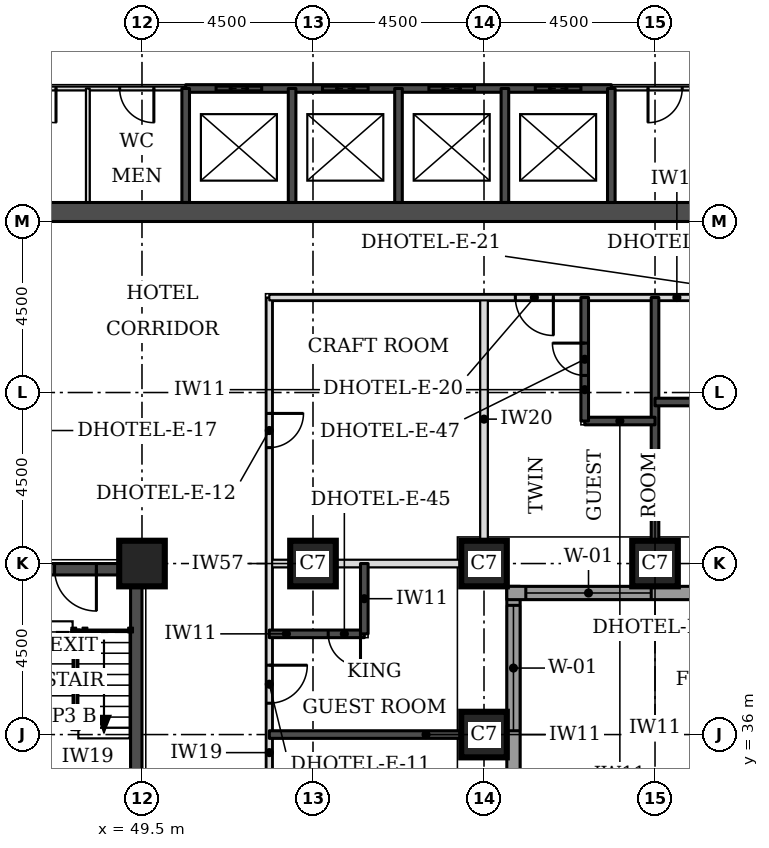
"""IFC4 building model, lengths in metres.
Left out: names, types, materials, properties, quantities, classifications, styles, units other than length and angle.
Written with IfcOpenShell. Run it as: python <this file> out.ifc"""

import sys

from ifc_helpers import new_model, si_unit, direction, frame, frame_2d, origin, origin_2d, place, context, subcontext, project, spatial, rectangle, extrude, element, fill, save


model = new_model("IFC4")
c1 = context("Model", 3, precision=1e-05, world=origin(), true_north=direction((0.0, 1.0)))
c2 = subcontext(c1, "Body", "Model", "MODEL_VIEW")
j1 = project(units=[si_unit("LENGTHUNIT", "METRE"), si_unit("PLANEANGLEUNIT", "RADIAN")], contexts=[c1])
p1 = place(None, origin())
s1 = spatial("IfcSite", under=j1, at=p1, CompositionType="ELEMENT")
p2 = place(p1, origin())
s2 = spatial("IfcBuilding", under=s1, at=p2, CompositionType="ELEMENT")
p3 = place(p2, frame((0.0, 0.0, 62.7)))
s3 = spatial("IfcBuildingStorey", under=s2, at=p3, CompositionType="ELEMENT", Elevation=62.7)
for number, where, z_axis, x_axis in (
    (1, (58.5, 36.0, 0.0), (0.0, 0.0, 1.0), (1.0, 0.0, 0.0)),
    (2, (49.5, 40.5, 0.0), (0.0, 0.0, 1.0), (1.0, 0.0, 0.0)),
    (3, (54.0, 40.5, 0.0), (0.0, 0.0, 1.0), (1.0, 0.0, 0.0)),
    (4, (58.5, 40.5, 0.0), (0.0, 0.0, 1.0), (1.0, 0.0, 0.0)),
    (5, (63.0, 40.5, 0.0), (0.0, 0.0, 1.0), (1.0, 0.0, 0.0)),
):
    element("IfcColumn", number, at=place(p3, frame(where, z_axis=z_axis, x_axis=x_axis)), inside=s3, PredefinedType="COLUMN", context=c2, shape_type="SweptSolid", body=[
        extrude(rectangle(XDim=1.2, YDim=1.2, at=origin_2d()), origin(), (0.0, 0.0, 1.0), 3.3),
    ])
p4 = place(p3, frame((45.5, 49.75, 0.0), z_axis=(0.0, 0.0, 1.0), x_axis=(1.0, 0.0, 0.0)))
e6 = element("IfcWall", 6, at=p4, inside=s3, PredefinedType="SHEAR", context=c2, shape_type="SweptSolid", body=[
    extrude(rectangle(XDim=21.5, YDim=0.5, at=frame_2d((10.75, 0.0))), origin(), (0.0, 0.0, 1.0), 3.3),
])
p5 = place(p3, frame((40.8, 40.35, 0.0), z_axis=(0.0, 0.0, 1.0), x_axis=(1.0, 0.0, 0.0)))
e7 = element("IfcWall", 7, at=p5, inside=s3, PredefinedType="SHEAR", context=c2, shape_type="SweptSolid", body=[
    extrude(rectangle(XDim=8.4, YDim=0.3, at=frame_2d((4.2, 0.0))), origin(), (0.0, 0.0, 1.0), 3.3),
])
p6 = place(p5, frame((6.4, 0.0, 0.0)))
e8 = element("IfcOpeningElement", 8, at=p6, cuts=e7, PredefinedType="OPENING", context=c2, shape_type="SweptSolid", body=[
    extrude(rectangle(XDim=1.1, YDim=2.1, at=frame_2d((0.55, 1.05))), frame((0.0, 0.16, 0.0), z_axis=(0.0, -1.0, 0.0), x_axis=(1.0, 0.0, 0.0)), (0.0, 0.0, 1.0), 0.32),
])
p7 = place(p3, frame((49.35, 31.5, 0.0), z_axis=(0.0, 0.0, 1.0), x_axis=(0.0, 1.0, 0.0)))
e9 = element("IfcWall", 9, at=p7, inside=s3, PredefinedType="SHEAR", context=c2, shape_type="SweptSolid", body=[
    extrude(rectangle(XDim=9.0, YDim=0.3, at=frame_2d((4.5, 0.0))), origin(), (0.0, 0.0, 1.0), 3.3),
])
p8 = place(p3, frame((59.275, 22.106, 0.0), z_axis=(0.0, 0.0, 1.0), x_axis=(0.0, 1.0, 0.0)))
e10 = element("IfcWall", 10, at=p8, inside=s3, PredefinedType="STANDARD", context=c2, shape_type="SweptSolid", body=[
    extrude(rectangle(XDim=17.793, YDim=0.35, at=frame_2d((8.897, 0.0))), origin(), (0.0, 0.0, 1.0), 3.055),
])
p9 = place(p8, frame((5.493, 0.0, 0.8)))
e11 = element("IfcOpeningElement", 11, at=p9, cuts=e10, PredefinedType="OPENING", context=c2, shape_type="SweptSolid", body=[
    extrude(rectangle(XDim=3.3, YDim=1.5, at=frame_2d((1.65, 0.75))), frame((0.0, 0.185, 0.0), z_axis=(0.0, -1.0, 0.0), x_axis=(1.0, 0.0, 0.0)), (0.0, 0.0, 1.0), 0.37),
])
p10 = place(p8, frame((13.993, 0.0, 0.8)))
e12 = element("IfcOpeningElement", 12, at=p10, cuts=e10, PredefinedType="OPENING", context=c2, shape_type="SweptSolid", body=[
    extrude(rectangle(XDim=3.3, YDim=1.5, at=frame_2d((1.65, 0.75))), frame((0.0, 0.185, 0.0), z_axis=(0.0, -1.0, 0.0), x_axis=(1.0, 0.0, 0.0)), (0.0, 0.0, 1.0), 0.37),
])
p11 = place(p3, frame((59.1, 39.725, 0.0), z_axis=(0.0, 0.0, 1.0), x_axis=(1.0, 0.0, 0.0)))
e13 = element("IfcWall", 13, at=p11, inside=s3, PredefinedType="STANDARD", context=c2, shape_type="SweptSolid", body=[
    extrude(rectangle(XDim=13.293, YDim=0.35, at=frame_2d((6.647, 0.0))), origin(), (0.0, 0.0, 1.0), 3.055),
])
p12 = place(p11, frame((0.5, 0.0, 0.8)))
e14 = element("IfcOpeningElement", 14, at=p12, cuts=e13, PredefinedType="OPENING", context=c2, shape_type="SweptSolid", body=[
    extrude(rectangle(XDim=3.3, YDim=1.5, at=frame_2d((1.65, 0.75))), frame((0.0, 0.185, 0.0), z_axis=(0.0, -1.0, 0.0), x_axis=(1.0, 0.0, 0.0)), (0.0, 0.0, 1.0), 0.37),
])
p13 = place(p3, frame((52.85, 40.5, 0.0), z_axis=(0.0, 0.0, 1.0), x_axis=(1.0, 0.0, 0.0)))
e15 = element("IfcWall", 15, at=p13, inside=s3, PredefinedType="PARTITIONING", context=c2, shape_type="SweptSolid", body=[
    extrude(rectangle(XDim=5.05, YDim=0.2, at=frame_2d((2.525, 0.0))), origin(), (0.0, 0.0, 1.0), 2.33),
])
p14 = place(p3, frame((58.5, 41.1, 0.0), z_axis=(0.0, 0.0, 1.0), x_axis=(0.0, 1.0, 0.0)))
e16 = element("IfcWall", 16, at=p14, inside=s3, PredefinedType="PARTITIONING", context=c2, shape_type="SweptSolid", body=[
    extrude(rectangle(XDim=6.4, YDim=0.2, at=frame_2d((3.2, 0.0))), origin(), (0.0, 0.0, 1.0), 3.08),
])
p15 = place(p3, frame((52.85, 25.15, 0.0), z_axis=(0.0, 0.0, 1.0), x_axis=(0.0, 1.0, 0.0)))
e17 = element("IfcWall", 17, at=p15, inside=s3, PredefinedType="PARTITIONING", context=c2, shape_type="SweptSolid", body=[
    extrude(rectangle(XDim=22.35, YDim=0.15, at=frame_2d((11.175, 0.0))), origin(), (0.0, 0.0, 1.0), 3.08),
])
p16 = place(p15, frame((0.347, 0.0, 0.0)))
e18 = element("IfcOpeningElement", 18, at=p16, cuts=e17, PredefinedType="OPENING", context=c2, shape_type="SweptSolid", body=[
    extrude(rectangle(XDim=1.0, YDim=2.1, at=frame_2d((0.5, 1.05))), frame((0.0, 0.085, 0.0), z_axis=(0.0, -1.0, 0.0), x_axis=(1.0, 0.0, 0.0)), (0.0, 0.0, 1.0), 0.17),
])
p17 = place(p15, frame((7.325, 0.0, 0.0)))
e19 = element("IfcOpeningElement", 19, at=p17, cuts=e17, PredefinedType="OPENING", context=c2, shape_type="SweptSolid", body=[
    extrude(rectangle(XDim=1.0, YDim=2.1, at=frame_2d((0.5, 1.05))), frame((0.0, 0.085, 0.0), z_axis=(0.0, -1.0, 0.0), x_axis=(1.0, 0.0, 0.0)), (0.0, 0.0, 1.0), 0.17),
])
p18 = place(p15, frame((11.675, 0.0, 0.0)))
e20 = element("IfcOpeningElement", 20, at=p18, cuts=e17, PredefinedType="OPENING", context=c2, shape_type="SweptSolid", body=[
    extrude(rectangle(XDim=1.0, YDim=2.1, at=frame_2d((0.5, 1.05))), frame((0.0, 0.085, 0.0), z_axis=(0.0, -1.0, 0.0), x_axis=(1.0, 0.0, 0.0)), (0.0, 0.0, 1.0), 0.17),
])
p19 = place(p15, frame((18.4, 0.0, 0.0)))
e21 = element("IfcOpeningElement", 21, at=p19, cuts=e17, PredefinedType="OPENING", context=c2, shape_type="SweptSolid", body=[
    extrude(rectangle(XDim=0.9, YDim=2.1, at=frame_2d((0.45, 1.05))), frame((0.0, 0.085, 0.0), z_axis=(0.0, -1.0, 0.0), x_axis=(1.0, 0.0, 0.0)), (0.0, 0.0, 1.0), 0.17),
])
p20 = place(p3, frame((52.85, 47.5, 0.0), z_axis=(0.0, 0.0, 1.0), x_axis=(1.0, 0.0, 0.0)))
e22 = element("IfcWall", 22, at=p20, inside=s3, PredefinedType="PARTITIONING", context=c2, shape_type="SweptSolid", body=[
    extrude(rectangle(XDim=16.65, YDim=0.15, at=frame_2d((8.325, 0.0))), origin(), (0.0, 0.0, 1.0), 3.08),
])
p21 = place(p20, frame((13.075, 0.0, 0.0)))
e23 = element("IfcOpeningElement", 23, at=p21, cuts=e22, PredefinedType="OPENING", context=c2, shape_type="SweptSolid", body=[
    extrude(rectangle(XDim=1.0, YDim=2.1, at=frame_2d((0.5, 1.05))), frame((0.0, 0.085, 0.0), z_axis=(0.0, -1.0, 0.0), x_axis=(1.0, 0.0, 0.0)), (0.0, 0.0, 1.0), 0.17),
])
p22 = place(p20, frame((6.475, 0.0, 0.0)))
e24 = element("IfcOpeningElement", 24, at=p22, cuts=e22, PredefinedType="OPENING", context=c2, shape_type="SweptSolid", body=[
    extrude(rectangle(XDim=1.0, YDim=2.1, at=frame_2d((0.5, 1.05))), frame((0.0, 0.085, 0.0), z_axis=(0.0, -1.0, 0.0), x_axis=(1.0, 0.0, 0.0)), (0.0, 0.0, 1.0), 0.17),
])
p23 = place(p20, frame((15.15, 0.0, 0.0)))
e25 = element("IfcOpeningElement", 25, at=p23, cuts=e22, PredefinedType="OPENING", context=c2, shape_type="SweptSolid", body=[
    extrude(rectangle(XDim=1.0, YDim=2.1, at=frame_2d((0.5, 1.05))), frame((0.0, 0.085, 0.0), z_axis=(0.0, -1.0, 0.0), x_axis=(1.0, 0.0, 0.0)), (0.0, 0.0, 1.0), 0.17),
])
p24 = place(p3, frame((52.85, 36.0, 0.0), z_axis=(0.0, 0.0, 1.0), x_axis=(1.0, 0.0, 0.0)))
e26 = element("IfcWall", 26, at=p24, inside=s3, PredefinedType="SOLIDWALL", context=c2, shape_type="SweptSolid", body=[
    extrude(rectangle(XDim=5.05, YDim=0.2, at=frame_2d((2.525, 0.0))), origin(), (0.0, 0.0, 1.0), 3.08),
])
p25 = place(p3, frame((52.85, 38.65, 0.0), z_axis=(0.0, 0.0, 1.0), x_axis=(1.0, 0.0, 0.0)))
e27 = element("IfcWall", 27, at=p25, inside=s3, PredefinedType="SOLIDWALL", context=c2, shape_type="SweptSolid", body=[
    extrude(rectangle(XDim=2.5, YDim=0.2, at=frame_2d((1.25, 0.0))), origin(), (0.0, 0.0, 1.0), 3.08),
])
p26 = place(p25, frame((1.55, 0.0, 0.0)))
e28 = element("IfcOpeningElement", 28, at=p26, cuts=e27, PredefinedType="OPENING", context=c2, shape_type="SweptSolid", body=[
    extrude(rectangle(XDim=0.85, YDim=2.1, at=frame_2d((0.425, 1.05))), frame((0.0, 0.11, 0.0), z_axis=(0.0, -1.0, 0.0), x_axis=(1.0, 0.0, 0.0)), (0.0, 0.0, 1.0), 0.22),
])
p27 = place(p3, frame((55.35, 38.65, 0.0), z_axis=(0.0, 0.0, 1.0), x_axis=(0.0, 1.0, 0.0)))
e29 = element("IfcWall", 29, at=p27, inside=s3, PredefinedType="SOLIDWALL", context=c2, shape_type="SweptSolid", body=[
    extrude(rectangle(XDim=1.85, YDim=0.2, at=frame_2d((0.925, 0.0))), origin(), (0.0, 0.0, 1.0), 3.08),
])
p28 = place(p3, frame((63.0, 41.1, 0.0), z_axis=(0.0, 0.0, 1.0), x_axis=(0.0, 1.0, 0.0)))
e30 = element("IfcWall", 30, at=p28, inside=s3, PredefinedType="SOLIDWALL", context=c2, shape_type="SweptSolid", body=[
    extrude(rectangle(XDim=6.4, YDim=0.2, at=frame_2d((3.2, 0.0))), origin(), (0.0, 0.0, 1.0), 3.08),
])
p29 = place(p3, frame((61.15, 44.25, 0.0), z_axis=(0.0, 0.0, 1.0), x_axis=(1.0, 0.0, 0.0)))
e31 = element("IfcWall", 31, at=p29, inside=s3, PredefinedType="SOLIDWALL", context=c2, shape_type="SweptSolid", body=[
    extrude(rectangle(XDim=1.85, YDim=0.2, at=frame_2d((0.925, 0.0))), origin(), (0.0, 0.0, 1.0), 3.08),
])
p30 = place(p3, frame((61.15, 44.25, 0.0), z_axis=(0.0, 0.0, 1.0), x_axis=(0.0, 1.0, 0.0)))
e32 = element("IfcWall", 32, at=p30, inside=s3, PredefinedType="SOLIDWALL", context=c2, shape_type="SweptSolid", body=[
    extrude(rectangle(XDim=3.25, YDim=0.2, at=frame_2d((1.625, 0.0))), origin(), (0.0, 0.0, 1.0), 3.08),
])
p31 = place(p30, frame((1.2, 0.0, 0.0)))
e33 = element("IfcOpeningElement", 33, at=p31, cuts=e32, PredefinedType="OPENING", context=c2, shape_type="SweptSolid", body=[
    extrude(rectangle(XDim=0.85, YDim=2.1, at=frame_2d((0.425, 1.05))), frame((0.0, 0.11, 0.0), z_axis=(0.0, -1.0, 0.0), x_axis=(1.0, 0.0, 0.0)), (0.0, 0.0, 1.0), 0.22),
])
p32 = place(p3, frame((63.0, 44.75, 0.0), z_axis=(0.0, 0.0, 1.0), x_axis=(1.0, 0.0, 0.0)))
e34 = element("IfcWall", 34, at=p32, inside=s3, PredefinedType="SOLIDWALL", context=c2, shape_type="SweptSolid", body=[
    extrude(rectangle(XDim=2.35, YDim=0.2, at=frame_2d((1.175, 0.0))), origin(), (0.0, 0.0, 1.0), 3.08),
])
p33 = place(p3, frame((45.5, 53.0, 0.0), z_axis=(0.0, 0.0, 1.0), x_axis=(1.0, 0.0, 0.0)))
e35 = element("IfcWall", 35, at=p33, inside=s3, PredefinedType="PARTITIONING", context=c2, shape_type="SweptSolid", body=[
    extrude(rectangle(XDim=5.15, YDim=0.1, at=frame_2d((2.575, 0.0))), origin(), (0.0, 0.0, 1.0), 3.08),
])
p34 = place(p33, frame((0.837, 0.0, 0.0)))
e36 = element("IfcOpeningElement", 36, at=p34, cuts=e35, PredefinedType="OPENING", context=c2, shape_type="SweptSolid", body=[
    extrude(rectangle(XDim=0.9, YDim=2.1, at=frame_2d((0.45, 1.05))), frame((0.0, 0.06, 0.0), z_axis=(0.0, -1.0, 0.0), x_axis=(1.0, 0.0, 0.0)), (0.0, 0.0, 1.0), 0.12),
])
p35 = place(p33, frame((3.413, 0.0, 0.0)))
e37 = element("IfcOpeningElement", 37, at=p35, cuts=e35, PredefinedType="OPENING", context=c2, shape_type="SweptSolid", body=[
    extrude(rectangle(XDim=0.9, YDim=2.1, at=frame_2d((0.45, 1.05))), frame((0.0, 0.06, 0.0), z_axis=(0.0, -1.0, 0.0), x_axis=(1.0, 0.0, 0.0)), (0.0, 0.0, 1.0), 0.12),
])
p36 = place(p3, frame((61.85, 53.0, 0.0), z_axis=(0.0, 0.0, 1.0), x_axis=(1.0, 0.0, 0.0)))
e38 = element("IfcWall", 38, at=p36, inside=s3, PredefinedType="PARTITIONING", context=c2, shape_type="SweptSolid", body=[
    extrude(rectangle(XDim=5.15, YDim=0.1, at=frame_2d((2.575, 0.0))), origin(), (0.0, 0.0, 1.0), 3.08),
])
p37 = place(p36, frame((3.491, 0.0, 0.0)))
e39 = element("IfcOpeningElement", 39, at=p37, cuts=e38, PredefinedType="OPENING", context=c2, shape_type="SweptSolid", body=[
    extrude(rectangle(XDim=1.0, YDim=2.1, at=frame_2d((0.5, 1.05))), frame((0.0, 0.06, 0.0), z_axis=(0.0, -1.0, 0.0), x_axis=(1.0, 0.0, 0.0)), (0.0, 0.0, 1.0), 0.12),
])
p38 = place(p36, frame((0.966, 0.0, 0.0)))
e40 = element("IfcOpeningElement", 40, at=p38, cuts=e38, PredefinedType="OPENING", context=c2, shape_type="SweptSolid", body=[
    extrude(rectangle(XDim=0.9, YDim=2.1, at=frame_2d((0.45, 1.05))), frame((0.0, 0.06, 0.0), z_axis=(0.0, -1.0, 0.0), x_axis=(1.0, 0.0, 0.0)), (0.0, 0.0, 1.0), 0.12),
])
p39 = place(p3, frame((50.65, 53.0, 0.0), z_axis=(0.0, 0.0, 1.0), x_axis=(1.0, 0.0, 0.0)))
e41 = element("IfcWall", 41, at=p39, inside=s3, PredefinedType="SOLIDWALL", context=c2, shape_type="SweptSolid", body=[
    extrude(rectangle(XDim=11.2, YDim=0.2, at=frame_2d((5.6, 0.0))), origin(), (0.0, 0.0, 1.0), 3.08),
])
p40 = place(p39, frame((0.8, 0.0, 0.0)))
e42 = element("IfcOpeningElement", 42, at=p40, cuts=e41, PredefinedType="OPENING", context=c2, shape_type="SweptSolid", body=[
    extrude(rectangle(XDim=1.2, YDim=2.1, at=frame_2d((0.6, 1.05))), frame((0.0, 0.11, 0.0), z_axis=(0.0, -1.0, 0.0), x_axis=(1.0, 0.0, 0.0)), (0.0, 0.0, 1.0), 0.22),
])
p41 = place(p39, frame((3.6, 0.0, 0.0)))
e43 = element("IfcOpeningElement", 43, at=p41, cuts=e41, PredefinedType="OPENING", context=c2, shape_type="SweptSolid", body=[
    extrude(rectangle(XDim=1.2, YDim=2.1, at=frame_2d((0.6, 1.05))), frame((0.0, 0.11, 0.0), z_axis=(0.0, -1.0, 0.0), x_axis=(1.0, 0.0, 0.0)), (0.0, 0.0, 1.0), 0.22),
])
p42 = place(p39, frame((6.4, 0.0, 0.0)))
e44 = element("IfcOpeningElement", 44, at=p42, cuts=e41, PredefinedType="OPENING", context=c2, shape_type="SweptSolid", body=[
    extrude(rectangle(XDim=1.2, YDim=2.1, at=frame_2d((0.6, 1.05))), frame((0.0, 0.11, 0.0), z_axis=(0.0, -1.0, 0.0), x_axis=(1.0, 0.0, 0.0)), (0.0, 0.0, 1.0), 0.22),
])
p43 = place(p39, frame((9.2, 0.0, 0.0)))
e45 = element("IfcOpeningElement", 45, at=p43, cuts=e41, PredefinedType="OPENING", context=c2, shape_type="SweptSolid", body=[
    extrude(rectangle(XDim=1.2, YDim=2.1, at=frame_2d((0.6, 1.05))), frame((0.0, 0.11, 0.0), z_axis=(0.0, -1.0, 0.0), x_axis=(1.0, 0.0, 0.0)), (0.0, 0.0, 1.0), 0.22),
])
p44 = place(p3, frame((48.075, 50.0, 0.0), z_axis=(0.0, 0.0, 1.0), x_axis=(0.0, 1.0, 0.0)))
e46 = element("IfcWall", 46, at=p44, inside=s3, PredefinedType="PARTITIONING", context=c2, shape_type="SweptSolid", body=[
    extrude(rectangle(XDim=3.0, YDim=0.1, at=frame_2d((1.5, 0.0))), origin(), (0.0, 0.0, 1.0), 3.08),
])
for number, where, z_axis, x_axis in (
    (47, (50.65, 50.0, 0.0), (0.0, 0.0, 1.0), (0.0, 1.0, 0.0)),
    (48, (53.45, 50.0, 0.0), (0.0, 0.0, 1.0), (0.0, 1.0, 0.0)),
    (49, (56.25, 50.0, 0.0), (0.0, 0.0, 1.0), (0.0, 1.0, 0.0)),
    (50, (59.05, 50.0, 0.0), (0.0, 0.0, 1.0), (0.0, 1.0, 0.0)),
    (51, (61.85, 50.0, 0.0), (0.0, 0.0, 1.0), (0.0, 1.0, 0.0)),
):
    element("IfcWall", number, at=place(p3, frame(where, z_axis=z_axis, x_axis=x_axis)), inside=s3, PredefinedType="SOLIDWALL", context=c2, shape_type="SweptSolid", body=[
        extrude(rectangle(XDim=3.0, YDim=0.2, at=frame_2d((1.5, 0.0))), origin(), (0.0, 0.0, 1.0), 3.08),
    ])
p45 = place(p10, origin())
e52 = element("IfcWindow", 52, at=p45, inside=s3, PartitioningType="SINGLE_PANEL", PredefinedType="WINDOW", context=c2, shape_type="SweptSolid", body=[
    extrude(rectangle(XDim=3.3, YDim=1.5, at=frame_2d((1.65, 0.75))), frame((0.0, 0.085, 0.0), z_axis=(0.0, -1.0, 0.0), x_axis=(1.0, 0.0, 0.0)), (0.0, 0.0, 1.0), 0.06),
])
fill(e12, e52)
p46 = place(p12, origin())
e53 = element("IfcWindow", 53, at=p46, inside=s3, PartitioningType="SINGLE_PANEL", PredefinedType="WINDOW", context=c2, shape_type="SweptSolid", body=[
    extrude(rectangle(XDim=3.3, YDim=1.5, at=frame_2d((1.65, 0.75))), frame((0.0, 0.085, 0.0), z_axis=(0.0, -1.0, 0.0), x_axis=(1.0, 0.0, 0.0)), (0.0, 0.0, 1.0), 0.06),
])
fill(e14, e53)
p47 = place(p18, frame((1.0, 0.0, 0.0), z_axis=(0.0, 0.0, 1.0), x_axis=(-1.0, 0.0, 0.0)))
e54 = element("IfcDoor", 54, at=p47, inside=s3, OperationType="SINGLE_SWING_LEFT", PredefinedType="DOOR", context=c2, shape_type="SweptSolid", body=[
    extrude(rectangle(XDim=1.0, YDim=2.1, at=frame_2d((0.5, 1.05))), frame((0.0, 0.025, 0.0), z_axis=(0.0, -1.0, 0.0), x_axis=(1.0, 0.0, 0.0)), (0.0, 0.0, 1.0), 0.05),
])
fill(e20, e54)
p48 = place(p26, frame((0.85, 0.0, 0.0), z_axis=(0.0, 0.0, 1.0), x_axis=(-1.0, 0.0, 0.0)))
e55 = element("IfcDoor", 55, at=p48, inside=s3, OperationType="SINGLE_SWING_LEFT", PredefinedType="DOOR", context=c2, shape_type="SweptSolid", body=[
    extrude(rectangle(XDim=0.85, YDim=2.1, at=frame_2d((0.425, 1.05))), frame((0.0, 0.025, 0.0), z_axis=(0.0, -1.0, 0.0), x_axis=(1.0, 0.0, 0.0)), (0.0, 0.0, 1.0), 0.05),
])
fill(e28, e55)
p49 = place(p22, frame((1.0, 0.0, 0.0), z_axis=(0.0, 0.0, 1.0), x_axis=(-1.0, 0.0, 0.0)))
e56 = element("IfcDoor", 56, at=p49, inside=s3, OperationType="SINGLE_SWING_LEFT", PredefinedType="DOOR", context=c2, shape_type="SweptSolid", body=[
    extrude(rectangle(XDim=1.0, YDim=2.1, at=frame_2d((0.5, 1.05))), frame((0.0, 0.025, 0.0), z_axis=(0.0, -1.0, 0.0), x_axis=(1.0, 0.0, 0.0)), (0.0, 0.0, 1.0), 0.05),
])
fill(e24, e56)
p50 = place(p31, origin())
e57 = element("IfcDoor", 57, at=p50, inside=s3, OperationType="SINGLE_SWING_RIGHT", PredefinedType="DOOR", context=c2, shape_type="SweptSolid", body=[
    extrude(rectangle(XDim=0.85, YDim=2.1, at=frame_2d((0.425, 1.05))), frame((0.0, 0.025, 0.0), z_axis=(0.0, -1.0, 0.0), x_axis=(1.0, 0.0, 0.0)), (0.0, 0.0, 1.0), 0.05),
])
fill(e33, e57)
p51 = place(p19, frame((0.9, 0.0, 0.0), z_axis=(0.0, 0.0, 1.0), x_axis=(-1.0, 0.0, 0.0)))
e58 = element("IfcDoor", 58, at=p51, inside=s3, OperationType="SINGLE_SWING_LEFT", PredefinedType="DOOR", context=c2, shape_type="SweptSolid", body=[
    extrude(rectangle(XDim=0.9, YDim=2.1, at=frame_2d((0.45, 1.05))), frame((0.0, 0.025, 0.0), z_axis=(0.0, -1.0, 0.0), x_axis=(1.0, 0.0, 0.0)), (0.0, 0.0, 1.0), 0.05),
])
fill(e21, e58)
p52 = place(p40, origin())
e59 = element("IfcDoor", 59, at=p52, inside=s3, OperationType="DOUBLE_DOOR_SLIDING", PredefinedType="DOOR", context=c2, shape_type="SweptSolid", body=[
    extrude(rectangle(XDim=1.2, YDim=2.1, at=frame_2d((0.6, 1.05))), frame((0.0, 0.025, 0.0), z_axis=(0.0, -1.0, 0.0), x_axis=(1.0, 0.0, 0.0)), (0.0, 0.0, 1.0), 0.05),
])
fill(e42, e59)
p53 = place(p41, origin())
e60 = element("IfcDoor", 60, at=p53, inside=s3, OperationType="DOUBLE_DOOR_SLIDING", PredefinedType="DOOR", context=c2, shape_type="SweptSolid", body=[
    extrude(rectangle(XDim=1.2, YDim=2.1, at=frame_2d((0.6, 1.05))), frame((0.0, 0.025, 0.0), z_axis=(0.0, -1.0, 0.0), x_axis=(1.0, 0.0, 0.0)), (0.0, 0.0, 1.0), 0.05),
])
fill(e43, e60)
p54 = place(p42, origin())
e61 = element("IfcDoor", 61, at=p54, inside=s3, OperationType="DOUBLE_DOOR_SLIDING", PredefinedType="DOOR", context=c2, shape_type="SweptSolid", body=[
    extrude(rectangle(XDim=1.2, YDim=2.1, at=frame_2d((0.6, 1.05))), frame((0.0, 0.025, 0.0), z_axis=(0.0, -1.0, 0.0), x_axis=(1.0, 0.0, 0.0)), (0.0, 0.0, 1.0), 0.05),
])
fill(e44, e61)
p55 = place(p43, origin())
e62 = element("IfcDoor", 62, at=p55, inside=s3, OperationType="DOUBLE_DOOR_SLIDING", PredefinedType="DOOR", context=c2, shape_type="SweptSolid", body=[
    extrude(rectangle(XDim=1.2, YDim=2.1, at=frame_2d((0.6, 1.05))), frame((0.0, 0.025, 0.0), z_axis=(0.0, -1.0, 0.0), x_axis=(1.0, 0.0, 0.0)), (0.0, 0.0, 1.0), 0.05),
])
fill(e45, e62)
p56 = place(p38, frame((0.9, 0.0, 0.0), z_axis=(0.0, 0.0, 1.0), x_axis=(-1.0, 0.0, 0.0)))
e63 = element("IfcDoor", 63, at=p56, inside=s3, OperationType="SINGLE_SWING_RIGHT", PredefinedType="DOOR", context=c2, shape_type="SweptSolid", body=[
    extrude(rectangle(XDim=0.9, YDim=2.1, at=frame_2d((0.45, 1.05))), frame((0.0, 0.025, 0.0), z_axis=(0.0, -1.0, 0.0), x_axis=(1.0, 0.0, 0.0)), (0.0, 0.0, 1.0), 0.05),
])
fill(e40, e63)
p57 = place(p34, frame((0.9, 0.0, 0.0), z_axis=(0.0, 0.0, 1.0), x_axis=(-1.0, 0.0, 0.0)))
e64 = element("IfcDoor", 64, at=p57, inside=s3, OperationType="SINGLE_SWING_LEFT", PredefinedType="DOOR", context=c2, shape_type="SweptSolid", body=[
    extrude(rectangle(XDim=0.9, YDim=2.1, at=frame_2d((0.45, 1.05))), frame((0.0, 0.025, 0.0), z_axis=(0.0, -1.0, 0.0), x_axis=(1.0, 0.0, 0.0)), (0.0, 0.0, 1.0), 0.05),
])
fill(e36, e64)
p58 = place(p35, frame((0.9, 0.0, 0.0), z_axis=(0.0, 0.0, 1.0), x_axis=(-1.0, 0.0, 0.0)))
e65 = element("IfcDoor", 65, at=p58, inside=s3, OperationType="SINGLE_SWING_LEFT", PredefinedType="DOOR", context=c2, shape_type="SweptSolid", body=[
    extrude(rectangle(XDim=0.9, YDim=2.1, at=frame_2d((0.45, 1.05))), frame((0.0, 0.025, 0.0), z_axis=(0.0, -1.0, 0.0), x_axis=(1.0, 0.0, 0.0)), (0.0, 0.0, 1.0), 0.05),
])
fill(e37, e65)
p59 = place(p6, frame((1.1, 0.0, 0.0), z_axis=(0.0, 0.0, 1.0), x_axis=(-1.0, 0.0, 0.0)))
e66 = element("IfcDoor", 66, at=p59, inside=s3, OperationType="SINGLE_SWING_LEFT", PredefinedType="DOOR", context=c2, shape_type="SweptSolid", body=[
    extrude(rectangle(XDim=1.1, YDim=2.1, at=frame_2d((0.55, 1.05))), frame((0.0, 0.025, 0.0), z_axis=(0.0, -1.0, 0.0), x_axis=(1.0, 0.0, 0.0)), (0.0, 0.0, 1.0), 0.05),
])
fill(e8, e66)
save(model, sys.argv[1])
